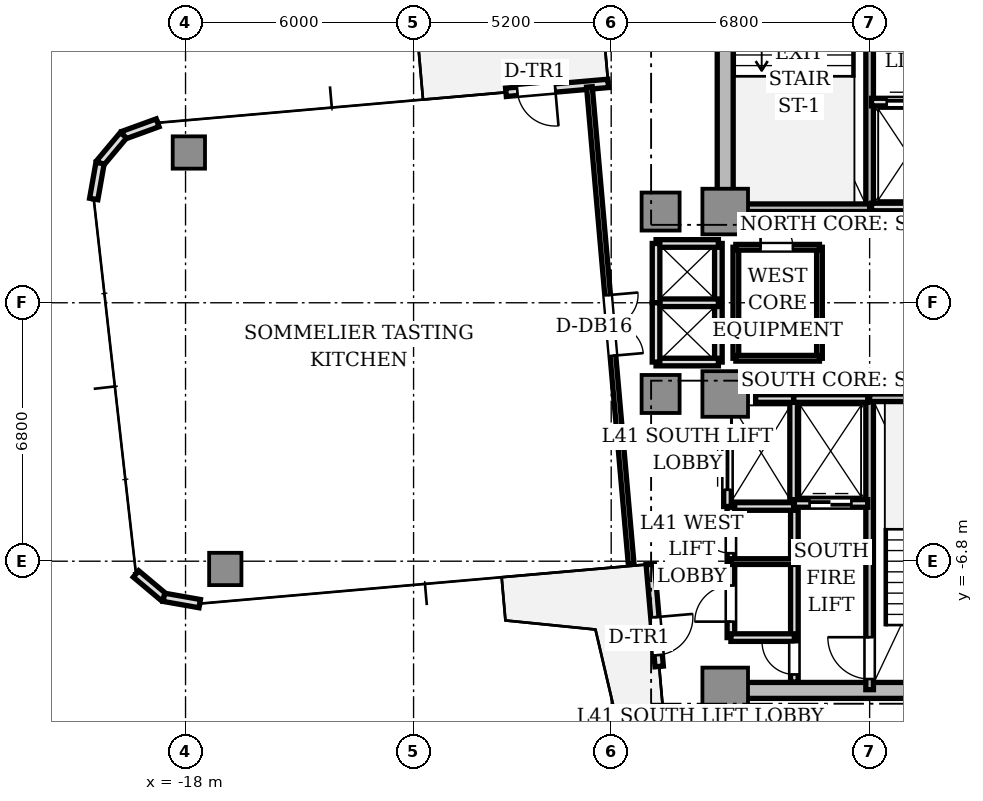
"""IFC4 building model, lengths in metres.
Left out: names, types, materials, properties, quantities, classifications, styles, units other than length and angle.
Written with IfcOpenShell. Run it as: python <this file> out.ifc"""

import sys

from ifc_helpers import new_model, si_unit, direction, frame, frame_2d, origin, origin_2d, place, context, subcontext, project, spatial, rectangle, extrude, source, transform, mapped, element, fill, save


model = new_model("IFC4")
c1 = context("Model", 3, precision=1e-05, world=origin(), true_north=direction((0.0, 1.0)))
c2 = subcontext(c1, "Body", "Model", "MODEL_VIEW")
j1 = project(units=[si_unit("LENGTHUNIT", "METRE"), si_unit("PLANEANGLEUNIT", "RADIAN")], contexts=[c1])
p1 = place(None, origin())
s1 = spatial("IfcSite", under=j1, at=p1, CompositionType="ELEMENT")
p2 = place(p1, origin())
s2 = spatial("IfcBuilding", under=s1, at=p2, CompositionType="ELEMENT")
p3 = place(p2, frame((0.0, 0.0, 150.6)))
s3 = spatial("IfcBuildingStorey", under=s2, at=p3, CompositionType="ELEMENT", Elevation=150.6)
p4 = place(p3, frame((-3.8, 2.85, 0.0), z_axis=(0.0, 0.0, 1.0), x_axis=(0.0, 1.0, 0.0)))
e1 = element("IfcWall", 1, at=p4, inside=s3, PredefinedType="SHEAR", context=c2, shape_type="SweptSolid", body=[
    extrude(rectangle(XDim=6.9, YDim=0.42, at=frame_2d((3.45, 0.0))), origin(), (0.0, 0.0, 1.0), 3.11),
])
p5 = place(p3, frame((-3.55, -10.2, 0.0), z_axis=(0.0, 0.0, 1.0), x_axis=(1.0, 0.0, 0.0)))
e2 = element("IfcWall", 2, at=p5, inside=s3, PredefinedType="SHEAR", context=c2, shape_type="SweptSolid", body=[
    extrude(rectangle(XDim=7.1, YDim=0.42, at=frame_2d((3.55, 0.0))), origin(), (0.0, 0.0, 1.0), 3.11),
])
m1 = source(origin(), c2, "Body", "SweptSolid", [
    extrude(rectangle(XDim=1.2, YDim=1.2, at=origin_2d()), origin(), (0.0, 0.0, 1.0), 3.11),
])
for number, where, z_axis, x_axis in (
    (3, (-3.8, 2.4, 0.0), (0.0, 0.0, 1.0), (1.0, 0.0, 0.0)),
    (4, (-3.8, -2.4, 0.0), (0.0, 0.0, 1.0), (1.0, 0.0, 0.0)),
    (5, (-3.8, -10.2, 0.0), (0.0, 0.0, 1.0), (1.0, 0.0, 0.0)),
):
    element("IfcColumn", number, at=place(p3, frame(where, z_axis=z_axis, x_axis=x_axis)), inside=s3, PredefinedType="COLUMN", context=c2, shape_type="MappedRepresentation", body=[
        mapped(m1, transform((0.0, 0.0, 0.0), scale=1.0)),
    ])
m2 = source(origin(), c2, "Body", "SweptSolid", [
    extrude(rectangle(XDim=1.0, YDim=1.0, at=origin_2d()), origin(), (0.0, 0.0, 1.0), 3.11),
])
for number, where, z_axis, x_axis in (
    (6, (-5.5, 2.4, 0.0), (0.0, 0.0, 1.0), (1.0, 0.0, 0.0)),
    (7, (-5.5, -2.4, 0.0), (0.0, 0.0, 1.0), (1.0, 0.0, 0.0)),
):
    element("IfcColumn", number, at=place(p3, frame(where, z_axis=z_axis, x_axis=x_axis)), inside=s3, PredefinedType="COLUMN", context=c2, shape_type="MappedRepresentation", body=[
        mapped(m2, transform((0.0, 0.0, 0.0), scale=1.0)),
    ])
m3 = source(origin(), c2, "Body", "SweptSolid", [
    extrude(rectangle(XDim=0.85, YDim=0.85, at=origin_2d()), origin(), (0.0, 0.0, 1.0), 3.11),
])
for number, where, z_axis, x_axis in (
    (8, (-17.913, 3.954, 0.0), (0.0, 0.0, 1.0), (1.0, 0.0, 0.0)),
    (9, (-16.954, -7.004, 0.0), (0.0, 0.0, 1.0), (1.0, 0.0, 0.0)),
):
    element("IfcColumn", number, at=place(p3, frame(where, z_axis=z_axis, x_axis=x_axis)), inside=s3, PredefinedType="COLUMN", context=c2, shape_type="MappedRepresentation", body=[
        mapped(m3, transform((0.0, 0.0, 0.0), scale=1.0)),
    ])
p6 = place(p3, frame((-6.879, 5.772, 0.0), z_axis=(0.0, 0.0, 1.0), x_axis=(-0.996193619346, -0.087168071984, 0.0)))
e10 = element("IfcWall", 10, at=p6, inside=s3, PredefinedType="STANDARD", context=c2, shape_type="SweptSolid", body=[
    extrude(rectangle(XDim=2.7, YDim=0.22, at=frame_2d((1.35, 0.0))), origin(), (0.0, 0.0, 1.0), 3.11),
])
p7 = place(p6, frame((1.4, 0.0, 0.0)))
e11 = element("IfcOpeningElement", 11, at=p7, cuts=e10, PredefinedType="OPENING", context=c2, shape_type="SweptSolid", body=[
    extrude(rectangle(XDim=1.0, YDim=2.2, at=frame_2d((0.5, 1.1))), frame((0.0, 0.12, 0.0), z_axis=(0.0, -1.0, 0.0), x_axis=(1.0, 0.0, 0.0)), (0.0, 0.0, 1.0), 0.24),
])
p8 = place(p3, frame((-18.734, 4.735, 0.0), z_axis=(0.0, 0.0, 1.0), x_axis=(-0.939741306239, -0.34188635151, 0.0)))
e12 = element("IfcWall", 12, at=p8, inside=s3, PredefinedType="STANDARD", context=c2, shape_type="SweptSolid", body=[
    extrude(rectangle(XDim=0.958, YDim=0.22, at=frame_2d((0.479, 0.0))), origin(), (0.0, 0.0, 1.0), 3.11),
])
for number, where, z_axis, x_axis in (
    (13, (-19.634, 4.408, 0.0), (0.0, 0.0, 1.0), (-0.643, -0.766, 0.0)),
    (14, (-20.25, 3.674, 0.0), (0.0, 0.0, 1.0), (-0.174, -0.985, 0.0)),
):
    element("IfcWall", number, at=place(p3, frame(where, z_axis=z_axis, x_axis=x_axis)), inside=s3, PredefinedType="STANDARD", context=c2, shape_type="SweptSolid", body=[
        extrude(rectangle(XDim=0.958, YDim=0.22, at=frame_2d((0.479, 0.0))), origin(), (0.0, 0.0, 1.0), 3.11),
    ])
p9 = place(p3, frame((-19.304, -7.135, 0.0), z_axis=(0.0, 0.0, 1.0), x_axis=(0.766001159887, -0.642839189107, 0.0)))
e15 = element("IfcWall", 15, at=p9, inside=s3, PredefinedType="STANDARD", context=c2, shape_type="SweptSolid", body=[
    extrude(rectangle(XDim=0.958, YDim=0.22, at=frame_2d((0.479, 0.0))), origin(), (0.0, 0.0, 1.0), 3.11),
])
p10 = place(p3, frame((-18.57, -7.75, 0.0), z_axis=(0.0, 0.0, 1.0), x_axis=(0.984770724397, -0.173858046606, 0.0)))
e16 = element("IfcWall", 16, at=p10, inside=s3, PredefinedType="STANDARD", context=c2, shape_type="SweptSolid", body=[
    extrude(rectangle(XDim=0.958, YDim=0.22, at=frame_2d((0.479, 0.0))), origin(), (0.0, 0.0, 1.0), 3.11),
])
p11 = place(p3, frame((-5.772, -6.879, 0.0), z_axis=(0.0, 0.0, 1.0), x_axis=(0.087168071984, -0.996193619346, 0.0)))
e17 = element("IfcWall", 17, at=p11, inside=s3, PredefinedType="STANDARD", context=c2, shape_type="SweptSolid", body=[
    extrude(rectangle(XDim=2.7, YDim=0.22, at=frame_2d((1.35, 0.0))), origin(), (0.0, 0.0, 1.0), 3.11),
])
p12 = place(p11, frame((1.4, 0.0, 0.0)))
e18 = element("IfcOpeningElement", 18, at=p12, cuts=e17, PredefinedType="OPENING", context=c2, shape_type="SweptSolid", body=[
    extrude(rectangle(XDim=1.0, YDim=2.2, at=frame_2d((0.5, 1.1))), frame((0.0, 0.12, 0.0), z_axis=(0.0, -1.0, 0.0), x_axis=(1.0, 0.0, 0.0)), (0.0, 0.0, 1.0), 0.24),
])
p13 = place(p3, frame((0.0, 2.5, 0.0), z_axis=(0.0, 0.0, 1.0), x_axis=(0.0, 1.0, 0.0)))
e19 = element("IfcWall", 19, at=p13, inside=s3, PredefinedType="SOLIDWALL", context=c2, shape_type="SweptSolid", body=[
    extrude(rectangle(XDim=7.68, YDim=0.2, at=frame_2d((3.84, 0.0))), origin(), (0.0, 0.0, 1.0), 3.11),
])
p14 = place(p13, frame((6.36, 0.0, 0.0)))
e20 = element("IfcOpeningElement", 20, at=p14, cuts=e19, PredefinedType="OPENING", context=c2, shape_type="SweptSolid", body=[
    extrude(rectangle(XDim=1.1, YDim=2.15, at=frame_2d((0.55, 1.075))), frame((0.0, 0.11, 0.0), z_axis=(0.0, -1.0, 0.0), x_axis=(1.0, 0.0, 0.0)), (0.0, 0.0, 1.0), 0.22),
])
p15 = place(p3, frame((-3.72, 2.5, 0.0), z_axis=(0.0, 0.0, 1.0), x_axis=(1.0, 0.0, 0.0)))
e21 = element("IfcWall", 21, at=p15, inside=s3, PredefinedType="SOLIDWALL", context=c2, shape_type="SweptSolid", body=[
    extrude(rectangle(XDim=3.72, YDim=0.2, at=frame_2d((1.86, 0.0))), origin(), (0.0, 0.0, 1.0), 3.11),
])
p16 = place(p3, frame((0.0, -10.18, 0.0), z_axis=(0.0, 0.0, 1.0), x_axis=(0.0, 1.0, 0.0)))
e22 = element("IfcWall", 22, at=p16, inside=s3, PredefinedType="SOLIDWALL", context=c2, shape_type="SweptSolid", body=[
    extrude(rectangle(XDim=7.68, YDim=0.2, at=frame_2d((3.84, 0.0))), origin(), (0.0, 0.0, 1.0), 3.11),
])
p17 = place(p16, frame((0.28, 0.0, 0.0)))
e23 = element("IfcOpeningElement", 23, at=p17, cuts=e22, PredefinedType="OPENING", context=c2, shape_type="SweptSolid", body=[
    extrude(rectangle(XDim=1.1, YDim=2.15, at=frame_2d((0.55, 1.075))), frame((0.0, 0.11, 0.0), z_axis=(0.0, -1.0, 0.0), x_axis=(1.0, 0.0, 0.0)), (0.0, 0.0, 1.0), 0.22),
])
p18 = place(p3, frame((0.0, -2.5, 0.0), z_axis=(0.0, 0.0, 1.0), x_axis=(1.0, 0.0, 0.0)))
e24 = element("IfcWall", 24, at=p18, inside=s3, PredefinedType="SOLIDWALL", context=c2, shape_type="SweptSolid", body=[
    extrude(rectangle(XDim=3.72, YDim=0.2, at=frame_2d((1.86, 0.0))), origin(), (0.0, 0.0, 1.0), 3.11),
])
p19 = place(p3, frame((-1.98, -9.98, 0.0), z_axis=(0.0, 0.0, 1.0), x_axis=(0.0, 1.0, 0.0)))
e25 = element("IfcWall", 25, at=p19, inside=s3, PredefinedType="SOLIDWALL", context=c2, shape_type="SweptSolid", body=[
    extrude(rectangle(XDim=4.66, YDim=0.2, at=frame_2d((2.33, 0.0))), origin(), (0.0, 0.0, 1.0), 2.66),
])
p20 = place(p19, frame((0.2, 0.0, 0.0)))
e26 = element("IfcOpeningElement", 26, at=p20, cuts=e25, PredefinedType="OPENING", context=c2, shape_type="SweptSolid", body=[
    extrude(rectangle(XDim=0.85, YDim=2.1, at=frame_2d((0.425, 1.05))), frame((0.0, 0.11, 0.0), z_axis=(0.0, -1.0, 0.0), x_axis=(1.0, 0.0, 0.0)), (0.0, 0.0, 1.0), 0.22),
])
p21 = place(p3, frame((0.05, 2.52, 0.0), z_axis=(0.0, 0.0, 1.0), x_axis=(1.0, 0.0, 0.0)))
e27 = element("IfcWall", 27, at=p21, inside=s3, PredefinedType="SOLIDWALL", context=c2, shape_type="SweptSolid", body=[
    extrude(rectangle(XDim=1.95, YDim=0.2, at=frame_2d((0.975, 0.0))), origin(), (0.0, 0.0, 1.0), 2.66),
])
p22 = place(p3, frame((0.05, 5.28, 0.0), z_axis=(0.0, 0.0, 1.0), x_axis=(1.0, 0.0, 0.0)))
e28 = element("IfcWall", 28, at=p22, inside=s3, PredefinedType="SOLIDWALL", context=c2, shape_type="SweptSolid", body=[
    extrude(rectangle(XDim=1.93, YDim=0.2, at=frame_2d((0.965, 0.0))), origin(), (0.0, 0.0, 1.0), 2.66),
])
p23 = place(p22, frame((0.4, 0.0, 0.0)))
e29 = element("IfcOpeningElement", 29, at=p23, cuts=e28, PredefinedType="OPENING", context=c2, shape_type="SweptSolid", body=[
    extrude(rectangle(XDim=1.1, YDim=2.2, at=frame_2d((0.55, 1.1))), frame((0.0, 0.11, 0.0), z_axis=(0.0, -1.0, 0.0), x_axis=(1.0, 0.0, 0.0)), (0.0, 0.0, 1.0), 0.22),
])
p24 = place(p3, frame((-2.0, -5.28, 0.0), z_axis=(0.0, 0.0, 1.0), x_axis=(0.0, 1.0, 0.0)))
e30 = element("IfcWall", 30, at=p24, inside=s3, PredefinedType="SOLIDWALL", context=c2, shape_type="SweptSolid", body=[
    extrude(rectangle(XDim=2.78, YDim=0.2, at=frame_2d((1.39, 0.0))), origin(), (0.0, 0.0, 1.0), 2.66),
])
p25 = place(p3, frame((-2.0, -2.52, 0.0), z_axis=(0.0, 0.0, 1.0), x_axis=(1.0, 0.0, 0.0)))
e31 = element("IfcWall", 31, at=p25, inside=s3, PredefinedType="SOLIDWALL", context=c2, shape_type="SweptSolid", body=[
    extrude(rectangle(XDim=1.95, YDim=0.2, at=frame_2d((0.975, 0.0))), origin(), (0.0, 0.0, 1.0), 2.66),
])
p26 = place(p3, frame((-1.98, -5.28, 0.0), z_axis=(0.0, 0.0, 1.0), x_axis=(1.0, 0.0, 0.0)))
e32 = element("IfcWall", 32, at=p26, inside=s3, PredefinedType="SOLIDWALL", context=c2, shape_type="SweptSolid", body=[
    extrude(rectangle(XDim=1.93, YDim=0.2, at=frame_2d((0.965, 0.0))), origin(), (0.0, 0.0, 1.0), 2.66),
])
p27 = place(p26, frame((0.4, 0.0, 0.0)))
e33 = element("IfcOpeningElement", 33, at=p27, cuts=e32, PredefinedType="OPENING", context=c2, shape_type="SweptSolid", body=[
    extrude(rectangle(XDim=1.1, YDim=2.2, at=frame_2d((0.55, 1.1))), frame((0.0, 0.11, 0.0), z_axis=(0.0, -1.0, 0.0), x_axis=(1.0, 0.0, 0.0)), (0.0, 0.0, 1.0), 0.22),
])
p28 = place(p3, frame((-3.0, -2.52, 0.0), z_axis=(0.0, 0.0, 1.0), x_axis=(1.0, 0.0, 0.0)))
e34 = element("IfcWall", 34, at=p28, inside=s3, PredefinedType="SOLIDWALL", context=c2, shape_type="SweptSolid", body=[
    extrude(rectangle(XDim=1.0, YDim=0.2, at=frame_2d((0.5, 0.0))), origin(), (0.0, 0.0, 1.0), 2.66),
])
p29 = place(p3, frame((-3.74, -5.36, 0.0), z_axis=(0.0, 0.0, 1.0), x_axis=(1.0, 0.0, 0.0)))
e35 = element("IfcWall", 35, at=p29, inside=s3, PredefinedType="SOLIDWALL", context=c2, shape_type="SweptSolid", body=[
    extrude(rectangle(XDim=1.74, YDim=0.2, at=frame_2d((0.87, 0.0))), origin(), (0.0, 0.0, 1.0), 2.66),
])
p30 = place(p3, frame((-3.74, -5.36, 0.0), z_axis=(0.0, 0.0, 1.0), x_axis=(0.0, 1.0, 0.0)))
e36 = element("IfcWall", 36, at=p30, inside=s3, PredefinedType="SOLIDWALL", context=c2, shape_type="SweptSolid", body=[
    extrude(rectangle(XDim=2.08, YDim=0.2, at=frame_2d((1.04, 0.0))), origin(), (0.0, 0.0, 1.0), 2.66),
])
p31 = place(p30, frame((0.44, 0.0, 0.0)))
e37 = element("IfcOpeningElement", 37, at=p31, cuts=e36, PredefinedType="OPENING", context=c2, shape_type="SweptSolid", body=[
    extrude(rectangle(XDim=1.2, YDim=2.2, at=frame_2d((0.6, 1.1))), frame((0.0, 0.11, 0.0), z_axis=(0.0, -1.0, 0.0), x_axis=(1.0, 0.0, 0.0)), (0.0, 0.0, 1.0), 0.22),
])
p32 = place(p3, frame((-3.98, -1.56, 0.0), z_axis=(0.0, 0.0, 1.0), x_axis=(0.0, 1.0, 0.0)))
e38 = element("IfcWall", 38, at=p32, inside=s3, PredefinedType="SOLIDWALL", context=c2, shape_type="SweptSolid", body=[
    extrude(rectangle(XDim=3.12, YDim=0.2, at=frame_2d((1.56, 0.0))), origin(), (0.0, 0.0, 1.0), 2.28),
])
for number, where, z_axis, x_axis in (
    (39, (-5.62, 1.56, 0.0), (0.0, 0.0, 1.0), (1.0, 0.0, 0.0)),
    (40, (-5.62, -1.56, 0.0), (0.0, 0.0, 1.0), (1.0, 0.0, 0.0)),
    (41, (-5.62, 0.0, 0.0), (0.0, 0.0, 1.0), (1.0, 0.0, 0.0)),
):
    element("IfcWall", number, at=place(p3, frame(where, z_axis=z_axis, x_axis=x_axis)), inside=s3, PredefinedType="SOLIDWALL", context=c2, shape_type="SweptSolid", body=[
        extrude(rectangle(XDim=1.64, YDim=0.2, at=frame_2d((0.82, 0.0))), origin(), (0.0, 0.0, 1.0), 2.66),
    ])
for number, where, z_axis, x_axis in (
    (42, (-5.62, 0.0, 0.0), (0.0, 0.0, 1.0), (0.0, 1.0, 0.0)),
    (43, (-5.62, -1.56, 0.0), (0.0, 0.0, 1.0), (0.0, 1.0, 0.0)),
):
    element("IfcWall", number, at=place(p3, frame(where, z_axis=z_axis, x_axis=x_axis)), inside=s3, PredefinedType="SOLIDWALL", context=c2, shape_type="SweptSolid", body=[
        extrude(rectangle(XDim=1.56, YDim=0.2, at=frame_2d((0.78, 0.0))), origin(), (0.0, 0.0, 1.0), 2.66),
    ])
p33 = place(p3, frame((-3.65, -8.81, 0.0), z_axis=(0.0, 0.0, 1.0), x_axis=(0.0, 1.0, 0.0)))
e44 = element("IfcWall", 44, at=p33, inside=s3, PredefinedType="SOLIDWALL", context=c2, shape_type="SweptSolid", body=[
    extrude(rectangle(XDim=3.43, YDim=0.2, at=frame_2d((1.715, 0.0))), origin(), (0.0, 0.0, 1.0), 2.66),
])
p34 = place(p33, frame((0.42, 0.0, 0.0)))
e45 = element("IfcOpeningElement", 45, at=p34, cuts=e44, PredefinedType="OPENING", context=c2, shape_type="SweptSolid", body=[
    extrude(rectangle(XDim=0.95, YDim=2.15, at=frame_2d((0.475, 1.075))), frame((0.0, 0.11, 0.0), z_axis=(0.0, -1.0, 0.0), x_axis=(1.0, 0.0, 0.0)), (0.0, 0.0, 1.0), 0.22),
])
p35 = place(p33, frame((2.22, 0.0, 0.0)))
e46 = element("IfcOpeningElement", 46, at=p35, cuts=e44, PredefinedType="OPENING", context=c2, shape_type="SweptSolid", body=[
    extrude(rectangle(XDim=0.85, YDim=2.1, at=frame_2d((0.425, 1.05))), frame((0.0, 0.11, 0.0), z_axis=(0.0, -1.0, 0.0), x_axis=(1.0, 0.0, 0.0)), (0.0, 0.0, 1.0), 0.22),
])
p36 = place(p3, frame((-3.65, -8.81, 0.0), z_axis=(0.0, 0.0, 1.0), x_axis=(1.0, 0.0, 0.0)))
e47 = element("IfcWall", 47, at=p36, inside=s3, PredefinedType="SOLIDWALL", context=c2, shape_type="SweptSolid", body=[
    extrude(rectangle(XDim=1.67, YDim=0.2, at=frame_2d((0.835, 0.0))), origin(), (0.0, 0.0, 1.0), 2.66),
])
p37 = place(p3, frame((-3.65, -6.81, 0.0), z_axis=(0.0, 0.0, 1.0), x_axis=(1.0, 0.0, 0.0)))
e48 = element("IfcWall", 48, at=p37, inside=s3, PredefinedType="PARTITIONING", context=c2, shape_type="SweptSolid", body=[
    extrude(rectangle(XDim=1.67, YDim=0.15, at=frame_2d((0.835, 0.0))), origin(), (0.0, 0.0, 1.0), 2.66),
])
p38 = place(p3, frame((-1.32, -1.46, 0.0), z_axis=(0.0, 0.0, 1.0), x_axis=(0.0, 1.0, 0.0)))
e49 = element("IfcWall", 49, at=p38, inside=s3, PredefinedType="PARTITIONING", context=c2, shape_type="SweptSolid", body=[
    extrude(rectangle(XDim=2.92, YDim=0.15, at=frame_2d((1.46, 0.0))), origin(), (0.0, 0.0, 1.0), 2.66),
])
p39 = place(p3, frame((-3.52, -1.46, 0.0), z_axis=(0.0, 0.0, 1.0), x_axis=(0.0, 1.0, 0.0)))
e50 = element("IfcWall", 50, at=p39, inside=s3, PredefinedType="PARTITIONING", context=c2, shape_type="SweptSolid", body=[
    extrude(rectangle(XDim=2.92, YDim=0.15, at=frame_2d((1.46, 0.0))), origin(), (0.0, 0.0, 1.0), 2.28),
])
p40 = place(p3, frame((-3.52, 1.46, 0.0), z_axis=(0.0, 0.0, 1.0), x_axis=(1.0, 0.0, 0.0)))
e51 = element("IfcWall", 51, at=p40, inside=s3, PredefinedType="PARTITIONING", context=c2, shape_type="SweptSolid", body=[
    extrude(rectangle(XDim=2.2, YDim=0.15, at=frame_2d((1.1, 0.0))), origin(), (0.0, 0.0, 1.0), 2.66),
])
p41 = place(p40, frame((0.65, 0.0, 0.0)))
e52 = element("IfcOpeningElement", 52, at=p41, cuts=e51, PredefinedType="OPENING", context=c2, shape_type="SweptSolid", body=[
    extrude(rectangle(XDim=0.85, YDim=2.1, at=frame_2d((0.425, 1.05))), frame((0.0, 0.085, 0.0), z_axis=(0.0, -1.0, 0.0), x_axis=(1.0, 0.0, 0.0)), (0.0, 0.0, 1.0), 0.17),
])
p42 = place(p3, frame((-3.52, -1.46, 0.0), z_axis=(0.0, 0.0, 1.0), x_axis=(1.0, 0.0, 0.0)))
e53 = element("IfcWall", 53, at=p42, inside=s3, PredefinedType="PARTITIONING", context=c2, shape_type="SweptSolid", body=[
    extrude(rectangle(XDim=2.2, YDim=0.15, at=frame_2d((1.1, 0.0))), origin(), (0.0, 0.0, 1.0), 2.66),
])
p43 = place(p3, frame((-7.373, 5.679, 0.0), z_axis=(0.0, 0.0, 1.0), x_axis=(0.087154691724, -0.996194790044, 0.0)))
e54 = element("IfcWall", 54, at=p43, inside=s3, PredefinedType="PARTITIONING", context=c2, shape_type="SweptSolid", body=[
    extrude(rectangle(XDim=12.6, YDim=0.15, at=frame_2d((6.3, 0.0))), origin(), (0.0, 0.0, 1.0), 2.66),
])
p44 = place(p43, frame((5.5, 0.0, 0.0)))
e55 = element("IfcOpeningElement", 55, at=p44, cuts=e54, PredefinedType="OPENING", context=c2, shape_type="SweptSolid", body=[
    extrude(rectangle(XDim=1.6, YDim=2.25, at=frame_2d((0.8, 1.125))), frame((0.0, 0.085, 0.0), z_axis=(0.0, -1.0, 0.0), x_axis=(1.0, 0.0, 0.0)), (0.0, 0.0, 1.0), 0.17),
])
m4 = source(origin(), c2, "Body", "SweptSolid", [
    extrude(rectangle(XDim=1.0, YDim=0.05, at=origin_2d()), origin(), (0.0, 0.0, 1.0), 2.2),
])
p45 = place(p7, frame((0.5, 0.0, 0.0)))
e56 = element("IfcDoor", 56, at=p45, inside=s3, OperationType="SINGLE_SWING_LEFT", PredefinedType="DOOR", context=c2, shape_type="MappedRepresentation", body=[
    mapped(m4, transform((0.0, 0.0, 0.0), scale=1.0)),
])
fill(e11, e56)
p46 = place(p12, frame((0.5, 0.0, 0.0)))
e57 = element("IfcDoor", 57, at=p46, inside=s3, OperationType="SINGLE_SWING_LEFT", PredefinedType="DOOR", context=c2, shape_type="MappedRepresentation", body=[
    mapped(m4, transform((0.0, 0.0, 0.0), scale=1.0)),
])
fill(e18, e57)
m5 = source(origin(), c2, "Body", "SweptSolid", [
    extrude(rectangle(XDim=1.1, YDim=0.05, at=origin_2d()), origin(), (0.0, 0.0, 1.0), 2.15),
])
p47 = place(p17, frame((0.55, 0.0, 0.0)))
e58 = element("IfcDoor", 58, at=p47, inside=s3, OperationType="SINGLE_SWING_RIGHT", PredefinedType="DOOR", context=c2, shape_type="MappedRepresentation", body=[
    mapped(m5, transform((0.0, 0.0, 0.0), scale=1.0)),
])
fill(e23, e58)
m6 = source(origin(), c2, "Body", "SweptSolid", [
    extrude(rectangle(XDim=0.85, YDim=0.05, at=origin_2d()), origin(), (0.0, 0.0, 1.0), 2.1),
])
p48 = place(p20, frame((0.425, 0.0, 0.0)))
e59 = element("IfcDoor", 59, at=p48, inside=s3, OperationType="SINGLE_SWING_RIGHT", PredefinedType="DOOR", context=c2, shape_type="MappedRepresentation", body=[
    mapped(m6, transform((0.0, 0.0, 0.0), scale=1.0)),
])
fill(e26, e59)
m7 = source(origin(), c2, "Body", "SweptSolid", [
    extrude(rectangle(XDim=1.1, YDim=0.05, at=origin_2d()), origin(), (0.0, 0.0, 1.0), 2.2),
])
p49 = place(p23, frame((0.55, 0.0, 0.0)))
e60 = element("IfcDoor", 60, at=p49, inside=s3, OperationType="DOUBLE_DOOR_SLIDING", PredefinedType="DOOR", context=c2, shape_type="MappedRepresentation", body=[
    mapped(m7, transform((0.0, 0.0, 0.0), scale=1.0)),
])
fill(e29, e60)
p50 = place(p27, frame((0.55, 0.0, 0.0)))
e61 = element("IfcDoor", 61, at=p50, inside=s3, OperationType="DOUBLE_DOOR_SLIDING", PredefinedType="DOOR", context=c2, shape_type="MappedRepresentation", body=[
    mapped(m7, transform((0.0, 0.0, 0.0), scale=1.0)),
])
fill(e33, e61)
m8 = source(origin(), c2, "Body", "SweptSolid", [
    extrude(rectangle(XDim=1.2, YDim=0.05, at=origin_2d()), origin(), (0.0, 0.0, 1.0), 2.2),
])
p51 = place(p31, frame((0.6, 0.0, 0.0)))
e62 = element("IfcDoor", 62, at=p51, inside=s3, OperationType="DOUBLE_DOOR_SLIDING", PredefinedType="DOOR", context=c2, shape_type="MappedRepresentation", body=[
    mapped(m8, transform((0.0, 0.0, 0.0), scale=1.0)),
])
fill(e37, e62)
m9 = source(origin(), c2, "Body", "SweptSolid", [
    extrude(rectangle(XDim=0.95, YDim=0.05, at=origin_2d()), origin(), (0.0, 0.0, 1.0), 2.15),
])
p52 = place(p34, frame((0.475, 0.0, 0.0)))
e63 = element("IfcDoor", 63, at=p52, inside=s3, OperationType="SINGLE_SWING_LEFT", PredefinedType="DOOR", context=c2, shape_type="MappedRepresentation", body=[
    mapped(m9, transform((0.0, 0.0, 0.0), scale=1.0)),
])
fill(e45, e63)
p53 = place(p35, frame((0.425, 0.0, 0.0)))
e64 = element("IfcDoor", 64, at=p53, inside=s3, OperationType="SINGLE_SWING_RIGHT", PredefinedType="DOOR", context=c2, shape_type="MappedRepresentation", body=[
    mapped(m6, transform((0.0, 0.0, 0.0), scale=1.0)),
])
fill(e46, e64)
p54 = place(p41, frame((0.425, 0.0, 0.0)))
e65 = element("IfcDoor", 65, at=p54, inside=s3, OperationType="SINGLE_SWING_LEFT", PredefinedType="DOOR", context=c2, shape_type="MappedRepresentation", body=[
    mapped(m6, transform((0.0, 0.0, 0.0), scale=1.0)),
])
fill(e52, e65)
m10 = source(origin(), c2, "Body", "SweptSolid", [
    extrude(rectangle(XDim=1.6, YDim=0.05, at=origin_2d()), origin(), (0.0, 0.0, 1.0), 2.25),
])
p55 = place(p44, frame((0.8, 0.0, 0.0)))
e66 = element("IfcDoor", 66, at=p55, inside=s3, OperationType="DOUBLE_DOOR_SINGLE_SWING", PredefinedType="DOOR", context=c2, shape_type="MappedRepresentation", body=[
    mapped(m10, transform((0.0, 0.0, 0.0), scale=1.0)),
])
fill(e55, e66)
save(model, sys.argv[1])
